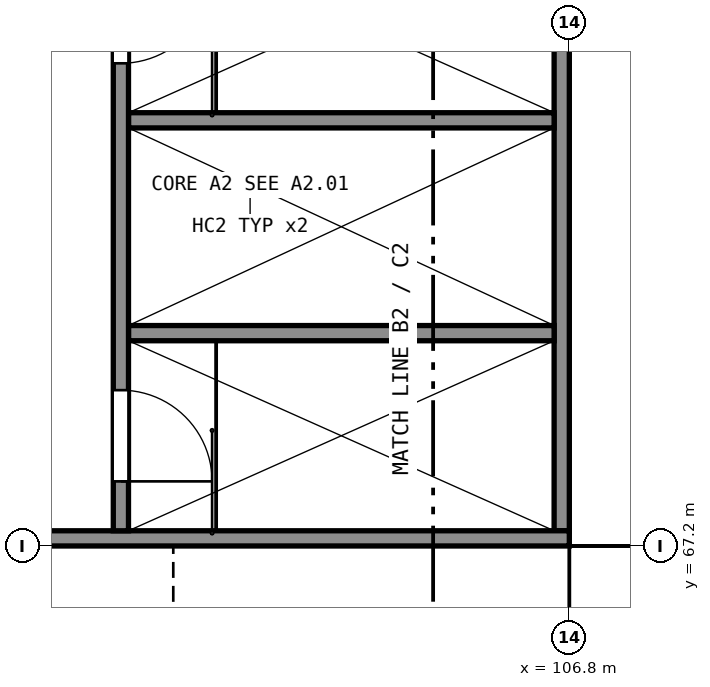
"""IFC4 building model, lengths in metres.
Left out: names, types, materials, properties, quantities, classifications, styles, units other than length and angle.
Written with IfcOpenShell. Run it as: python <this file> out.ifc"""

import sys

from ifc_helpers import new_model, si_unit, direction, frame, frame_2d, origin, place, context, subcontext, project, spatial, rectangle, extrude, element, fill, save


model = new_model("IFC4")
c1 = context("Model", 3, precision=1e-05, world=origin(), true_north=direction((0.0, 1.0)))
c2 = subcontext(c1, "Body", "Model", "MODEL_VIEW")
j1 = project(units=[si_unit("LENGTHUNIT", "METRE"), si_unit("PLANEANGLEUNIT", "RADIAN")], contexts=[c1])
p1 = place(None, origin())
s1 = spatial("IfcSite", under=j1, at=p1, CompositionType="ELEMENT")
p2 = place(p1, origin())
s2 = spatial("IfcBuilding", under=s1, at=p2, CompositionType="ELEMENT")
p3 = place(p2, frame((0.0, 0.0, 30.0)))
s3 = spatial("IfcBuildingStorey", under=s2, at=p3, CompositionType="ELEMENT", Elevation=30.0)
p4 = place(p3, frame((98.4, 67.3, 0.0), z_axis=(0.0, 0.0, 1.0), x_axis=(1.0, 0.0, 0.0)))
e1 = element("IfcWall", 1, at=p4, inside=s3, PredefinedType="SHEAR", context=c2, shape_type="SweptSolid", body=[
    extrude(rectangle(XDim=8.4, YDim=0.2, at=frame_2d((4.2, 0.0))), origin(), (0.0, 0.0, 1.0), 9.067),
])
p5 = place(p3, frame((106.7, 67.4, 0.0), z_axis=(0.0, 0.0, 1.0), x_axis=(0.0, 1.0, 0.0)))
e2 = element("IfcWall", 2, at=p5, inside=s3, PredefinedType="SHEAR", context=c2, shape_type="SweptSolid", body=[
    extrude(rectangle(XDim=8.0, YDim=0.2, at=frame_2d((4.0, 0.0))), origin(), (0.0, 0.0, 1.0), 9.067),
])
p6 = place(p3, frame((100.9, 67.4, 0.0), z_axis=(0.0, 0.0, 1.0), x_axis=(0.0, 1.0, 0.0)))
e3 = element("IfcWall", 3, at=p6, inside=s3, PredefinedType="SHEAR", context=c2, shape_type="SweptSolid", body=[
    extrude(rectangle(XDim=8.0, YDim=0.2, at=frame_2d((4.0, 0.0))), origin(), (0.0, 0.0, 1.0), 9.067),
])
p7 = place(p6, frame((0.65, 0.0, 0.0)))
e4 = element("IfcOpeningElement", 4, at=p7, cuts=e3, PredefinedType="OPENING", context=c2, shape_type="SweptSolid", body=[
    extrude(rectangle(XDim=1.2, YDim=2.1, at=frame_2d((0.6, 1.05))), frame((0.0, 0.11, 0.0), z_axis=(0.0, -1.0, 0.0), x_axis=(1.0, 0.0, 0.0)), (0.0, 0.0, 1.0), 0.22),
])
p8 = place(p6, frame((6.15, 0.0, 0.0)))
e5 = element("IfcOpeningElement", 5, at=p8, cuts=e3, PredefinedType="OPENING", context=c2, shape_type="SweptSolid", body=[
    extrude(rectangle(XDim=1.2, YDim=2.1, at=frame_2d((0.6, 1.05))), frame((0.0, 0.11, 0.0), z_axis=(0.0, -1.0, 0.0), x_axis=(1.0, 0.0, 0.0)), (0.0, 0.0, 1.0), 0.22),
])
for number, where, z_axis, x_axis in (
    (6, (101.0, 70.0, 0.0), (0.0, 0.0, 1.0), (1.0, 0.0, 0.0)),
    (7, (101.0, 72.8, 0.0), (0.0, 0.0, 1.0), (1.0, 0.0, 0.0)),
):
    element("IfcWall", number, at=place(p3, frame(where, z_axis=z_axis, x_axis=x_axis)), inside=s3, PredefinedType="SHEAR", context=c2, shape_type="SweptSolid", body=[
        extrude(rectangle(XDim=5.6, YDim=0.2, at=frame_2d((2.8, 0.0))), origin(), (0.0, 0.0, 1.0), 9.067),
    ])
p9 = place(p2, frame((0.0, 0.0, 25.0)))
s4 = spatial("IfcBuildingStorey", under=s2, at=p9, CompositionType="ELEMENT", Elevation=25.0)
p10 = place(p9, frame((106.95, 67.2, 0.0), z_axis=(0.0, 0.0, 1.0), x_axis=(1.0, 0.0, 0.0)))
e8 = element("IfcWall", 8, at=p10, inside=s4, PredefinedType="PARTITIONING", context=c2, shape_type="SweptSolid", body=[
    extrude(rectangle(XDim=8.25, YDim=0.2, at=frame_2d((4.125, 0.0))), origin(), (0.0, 0.0, 1.0), 11.39),
])
p11 = place(p10, frame((4.825, 0.0, 0.0)))
e9 = element("IfcOpeningElement", 9, at=p11, cuts=e8, PredefinedType="OPENING", context=c2, shape_type="SweptSolid", body=[
    extrude(rectangle(XDim=2.4, YDim=2.4, at=frame_2d((1.2, 1.2))), frame((0.0, 0.11, 0.0), z_axis=(0.0, -1.0, 0.0), x_axis=(1.0, 0.0, 0.0)), (0.0, 0.0, 1.0), 0.22),
])
p12 = place(p7, origin())
e10 = element("IfcDoor", 10, at=p12, inside=s3, OperationType="SINGLE_SWING_LEFT", PredefinedType="DOOR", context=c2, shape_type="SweptSolid", body=[
    extrude(rectangle(XDim=1.2, YDim=2.1, at=frame_2d((0.6, 1.05))), frame((0.0, 0.025, 0.0), z_axis=(0.0, -1.0, 0.0), x_axis=(1.0, 0.0, 0.0)), (0.0, 0.0, 1.0), 0.05),
])
fill(e4, e10)
p13 = place(p8, origin())
e11 = element("IfcDoor", 11, at=p13, inside=s3, OperationType="SINGLE_SWING_RIGHT", PredefinedType="DOOR", context=c2, shape_type="SweptSolid", body=[
    extrude(rectangle(XDim=1.2, YDim=2.1, at=frame_2d((0.6, 1.05))), frame((0.0, 0.025, 0.0), z_axis=(0.0, -1.0, 0.0), x_axis=(1.0, 0.0, 0.0)), (0.0, 0.0, 1.0), 0.05),
])
fill(e5, e11)
save(model, sys.argv[1])
